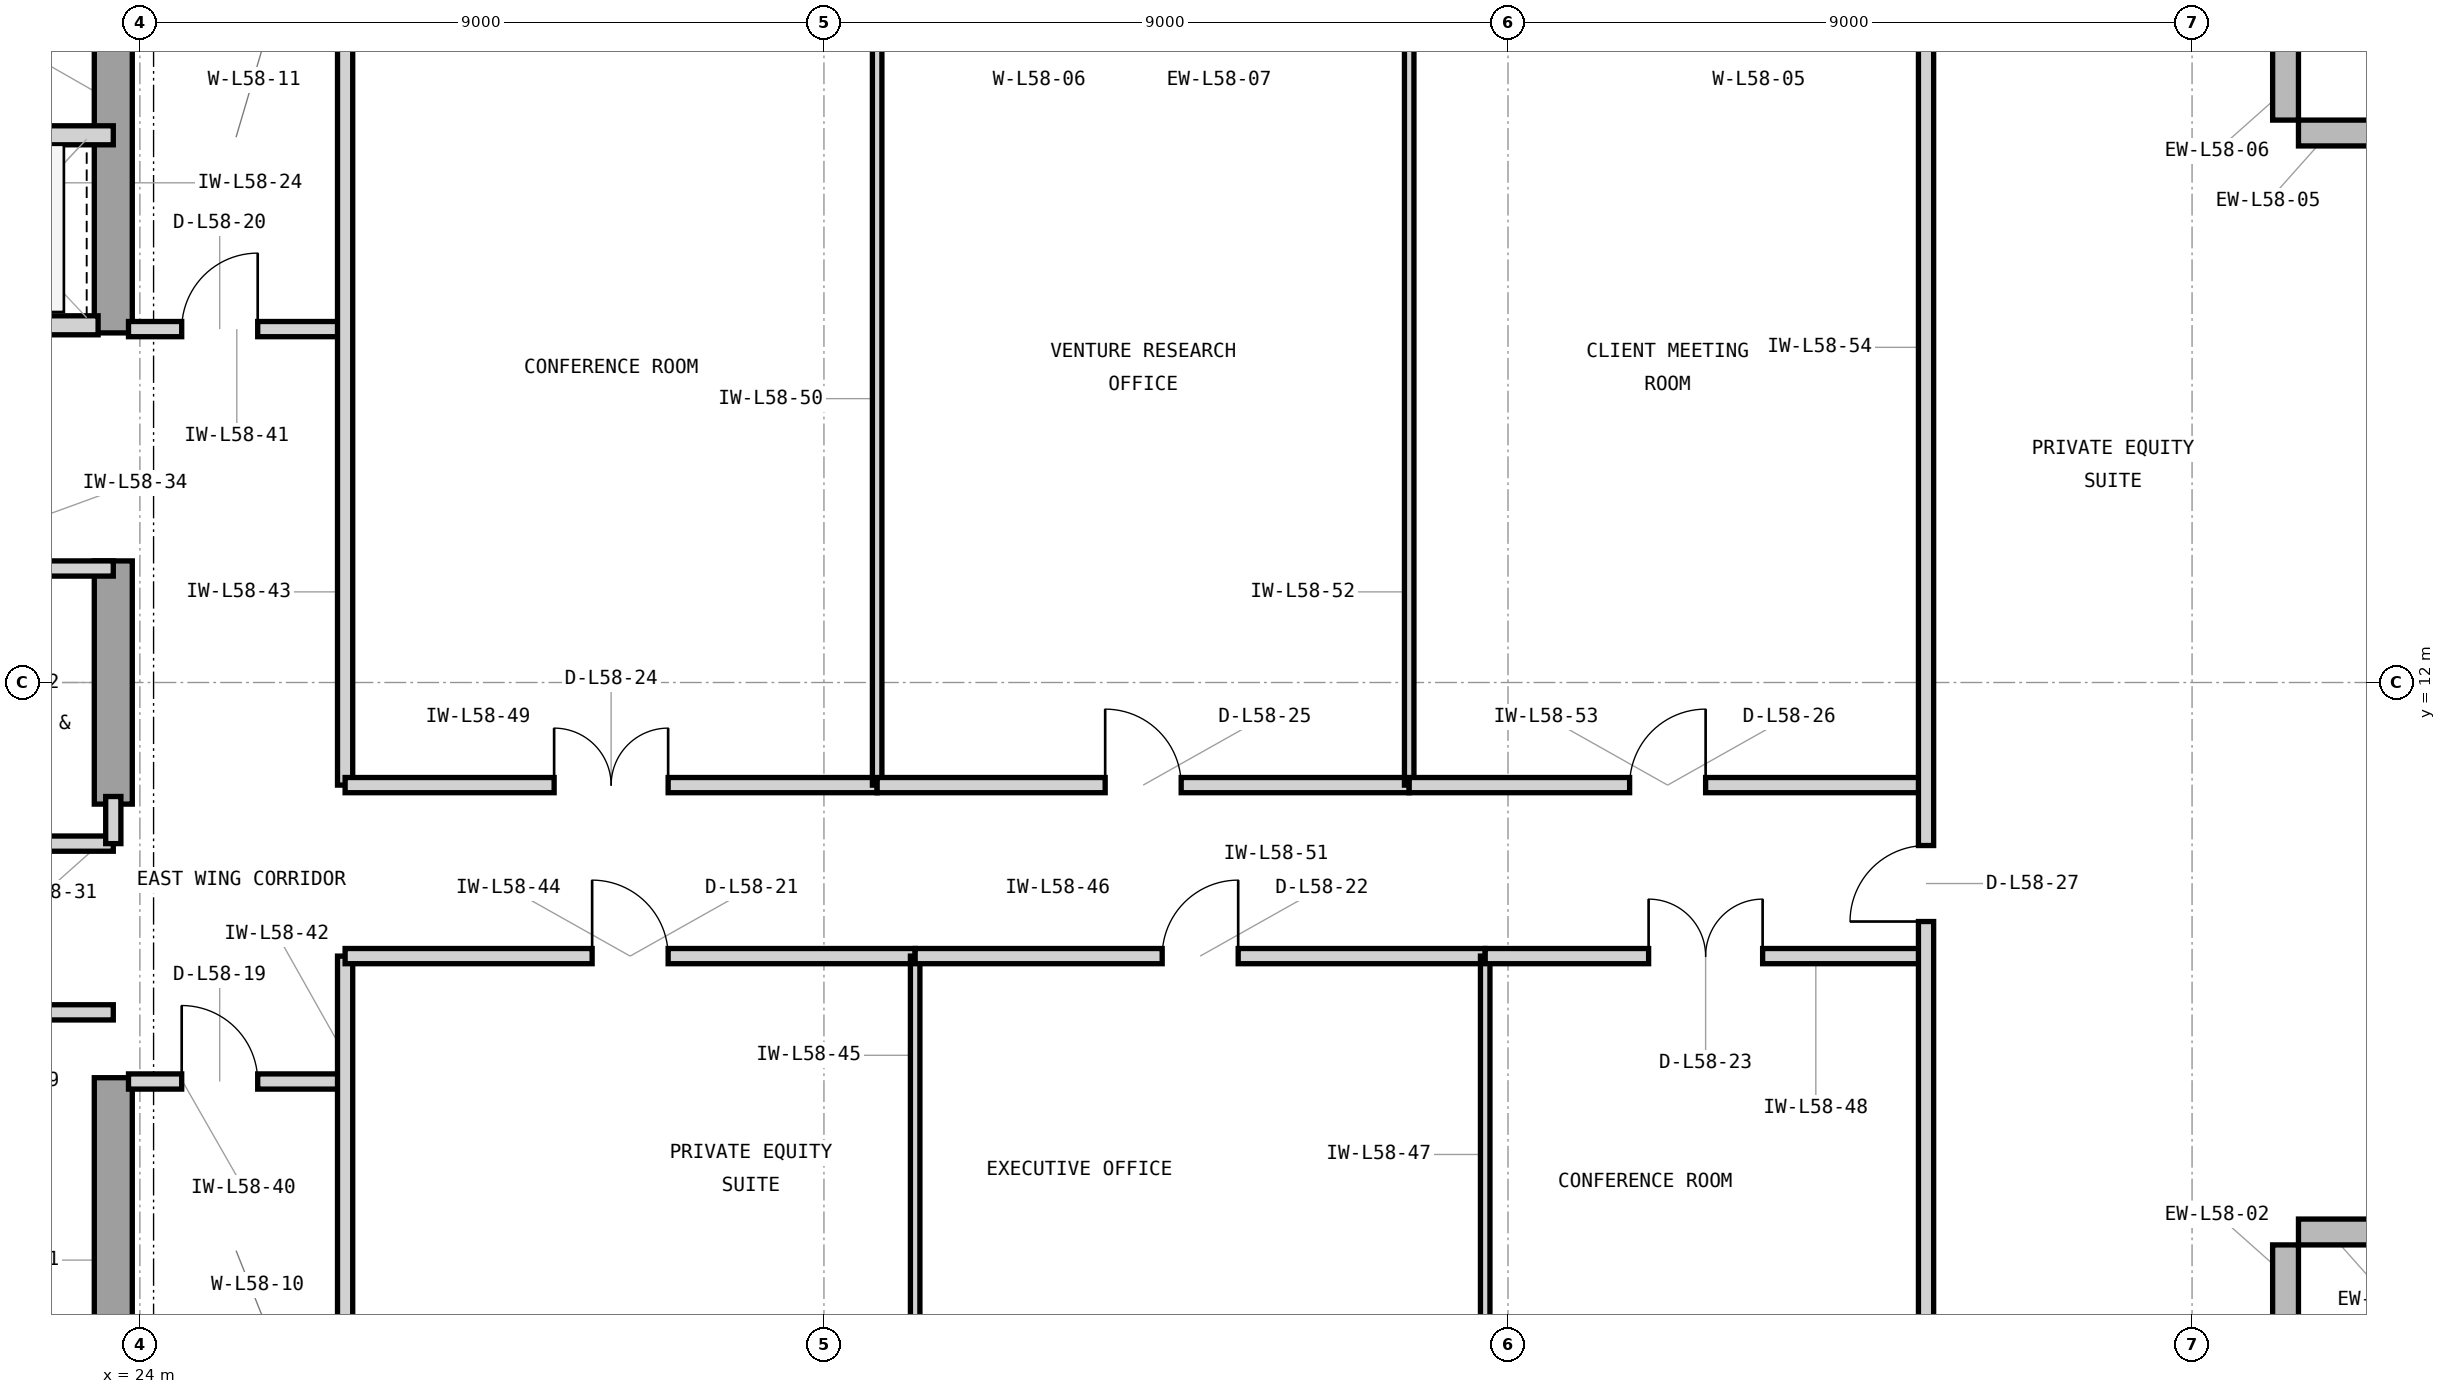
"""IFC4 building model, lengths in metres.
Left out: names, types, materials, properties, quantities, classifications, styles, units other than length and angle.
Written with IfcOpenShell. Run it as: python <this file> out.ifc"""

import sys

from ifc_helpers import new_model, si_unit, direction, frame, frame_2d, origin, place, context, subcontext, project, spatial, rectangle, extrude, element, fill, save


model = new_model("IFC4")
c1 = context("Model", 3, precision=1e-05, world=origin(), true_north=direction((0.0, 1.0)))
c2 = subcontext(c1, "Body", "Model", "MODEL_VIEW")
j1 = project(units=[si_unit("LENGTHUNIT", "METRE"), si_unit("PLANEANGLEUNIT", "RADIAN")], contexts=[c1])
p1 = place(None, origin())
s1 = spatial("IfcSite", under=j1, at=p1, CompositionType="ELEMENT")
p2 = place(p1, origin())
s2 = spatial("IfcBuilding", under=s1, at=p2, CompositionType="ELEMENT")
p3 = place(p2, frame((0.0, 0.0, 239.1)))
s3 = spatial("IfcBuildingStorey", under=s2, at=p3, CompositionType="ELEMENT", Elevation=239.1)
p4 = place(p3, frame((23.65, 3.6, 0.0), z_axis=(0.0, 0.0, 1.0), x_axis=(0.0, 1.0, 0.0)))
e1 = element("IfcWall", 1, at=p4, inside=s3, PredefinedType="SHEAR", context=c2, shape_type="SweptSolid", body=[
    extrude(rectangle(XDim=3.2, YDim=0.5, at=frame_2d((1.6, 0.0))), origin(), (0.0, 0.0, 1.0), 3.9),
])
p5 = place(p3, frame((23.65, 10.4, 0.0), z_axis=(0.0, 0.0, 1.0), x_axis=(0.0, 1.0, 0.0)))
e2 = element("IfcWall", 2, at=p5, inside=s3, PredefinedType="SHEAR", context=c2, shape_type="SweptSolid", body=[
    extrude(rectangle(XDim=3.2, YDim=0.5, at=frame_2d((1.6, 0.0))), origin(), (0.0, 0.0, 1.0), 3.9),
])
p6 = place(p3, frame((23.65, 16.6, 0.0), z_axis=(0.0, 0.0, 1.0), x_axis=(0.0, 1.0, 0.0)))
e3 = element("IfcWall", 3, at=p6, inside=s3, PredefinedType="SHEAR", context=c2, shape_type="SweptSolid", body=[
    extrude(rectangle(XDim=4.05, YDim=0.5, at=frame_2d((2.025, 0.0))), origin(), (0.0, 0.0, 1.0), 3.9),
])
for number, where, z_axis, x_axis in (
    (4, (52.23, 3.0, 0.0), (0.0, 0.0, 1.0), (0.0, 1.0, 0.0)),
    (5, (52.4, 4.77, 0.0), (0.0, 0.0, 1.0), (1.0, 0.0, 0.0)),
    (6, (54.0, 19.23, 0.0), (0.0, 0.0, 1.0), (-1.0, 0.0, 0.0)),
    (7, (52.23, 19.4, 0.0), (0.0, 0.0, 1.0), (0.0, 1.0, 0.0)),
):
    element("IfcWall", number, at=place(p3, frame(where, z_axis=z_axis, x_axis=x_axis)), inside=s3, PredefinedType="STANDARD", context=c2, shape_type="SweptSolid", body=[
        extrude(rectangle(XDim=1.6, YDim=0.34, at=frame_2d((0.8, 0.0))), origin(), (0.0, 0.0, 1.0), 3.7),
    ])
p7 = place(p3, frame((21.05, 16.7, 0.0), z_axis=(0.0, 0.0, 1.0), x_axis=(1.0, 0.0, 0.0)))
e8 = element("IfcWall", 8, at=p7, inside=s3, PredefinedType="PARTITIONING", context=c2, shape_type="SweptSolid", body=[
    extrude(rectangle(XDim=2.4, YDim=0.25, at=frame_2d((1.2, 0.0))), origin(), (0.0, 0.0, 1.0), 3.073),
])
p8 = place(p7, frame((0.52, 0.0, 0.0)))
e9 = element("IfcOpeningElement", 9, at=p8, cuts=e8, PredefinedType="OPENING", context=c2, shape_type="SweptSolid", body=[
    extrude(rectangle(XDim=1.15, YDim=2.25, at=frame_2d((0.575, 1.125))), frame((0.0, 0.135, 0.0), z_axis=(0.0, -1.0, 0.0), x_axis=(1.0, 0.0, 0.0)), (0.0, 0.0, 1.0), 0.27),
])
p9 = place(p3, frame((16.45, 19.2, 0.0), z_axis=(0.0, 0.0, 1.0), x_axis=(1.0, 0.0, 0.0)))
e10 = element("IfcWall", 10, at=p9, inside=s3, PredefinedType="PARTITIONING", context=c2, shape_type="SweptSolid", body=[
    extrude(rectangle(XDim=7.2, YDim=0.25, at=frame_2d((3.6, 0.0))), origin(), (0.0, 0.0, 1.0), 3.69),
])
p10 = place(p3, frame((20.85, 7.66, 0.0), z_axis=(0.0, 0.0, 1.0), x_axis=(1.0, 0.0, 0.0)))
e11 = element("IfcWall", 11, at=p10, inside=s3, PredefinedType="PARTITIONING", context=c2, shape_type="SweptSolid", body=[
    extrude(rectangle(XDim=2.8, YDim=0.2, at=frame_2d((1.4, 0.0))), origin(), (0.0, 0.0, 1.0), 3.69),
])
p11 = place(p10, frame((0.95, 0.0, 0.0)))
e12 = element("IfcOpeningElement", 12, at=p11, cuts=e11, PredefinedType="OPENING", context=c2, shape_type="SweptSolid", body=[
    extrude(rectangle(XDim=0.9, YDim=2.1, at=frame_2d((0.45, 1.05))), frame((0.0, 0.11, 0.0), z_axis=(0.0, -1.0, 0.0), x_axis=(1.0, 0.0, 0.0)), (0.0, 0.0, 1.0), 0.22),
])
p12 = place(p3, frame((14.825, 9.88, 0.0), z_axis=(0.0, 0.0, 1.0), x_axis=(1.0, 0.0, 0.0)))
e13 = element("IfcWall", 13, at=p12, inside=s3, PredefinedType="PARTITIONING", context=c2, shape_type="SweptSolid", body=[
    extrude(rectangle(XDim=8.825, YDim=0.2, at=frame_2d((4.413, 0.0))), origin(), (0.0, 0.0, 1.0), 3.69),
])
p13 = place(p3, frame((23.65, 9.88, 0.0), z_axis=(0.0, 0.0, 1.0), x_axis=(0.0, 1.0, 0.0)))
e14 = element("IfcWall", 14, at=p13, inside=s3, PredefinedType="PARTITIONING", context=c2, shape_type="SweptSolid", body=[
    extrude(rectangle(XDim=0.62, YDim=0.2, at=frame_2d((0.31, 0.0))), origin(), (0.0, 0.0, 1.0), 3.69),
])
p14 = place(p3, frame((19.9, 13.5, 0.0), z_axis=(0.0, 0.0, 1.0), x_axis=(1.0, 0.0, 0.0)))
e15 = element("IfcWall", 15, at=p14, inside=s3, PredefinedType="PARTITIONING", context=c2, shape_type="SweptSolid", body=[
    extrude(rectangle(XDim=3.75, YDim=0.2, at=frame_2d((1.875, 0.0))), origin(), (0.0, 0.0, 1.0), 3.073),
])
p15 = place(p14, frame((1.4, 0.0, 0.0)))
e16 = element("IfcOpeningElement", 16, at=p15, cuts=e15, PredefinedType="OPENING", context=c2, shape_type="SweptSolid", body=[
    extrude(rectangle(XDim=0.95, YDim=2.1, at=frame_2d((0.475, 1.05))), frame((0.0, 0.11, 0.0), z_axis=(0.0, -1.0, 0.0), x_axis=(1.0, 0.0, 0.0)), (0.0, 0.0, 1.0), 0.22),
])
p16 = place(p3, frame((23.85, 6.75, 0.0), z_axis=(0.0, 0.0, 1.0), x_axis=(1.0, 0.0, 0.0)))
e17 = element("IfcWall", 17, at=p16, inside=s3, PredefinedType="PARTITIONING", context=c2, shape_type="SweptSolid", body=[
    extrude(rectangle(XDim=2.85, YDim=0.2, at=frame_2d((1.425, 0.0))), origin(), (0.0, 0.0, 1.0), 3.69),
])
p17 = place(p16, frame((0.7, 0.0, 0.0)))
e18 = element("IfcOpeningElement", 18, at=p17, cuts=e17, PredefinedType="OPENING", context=c2, shape_type="SweptSolid", body=[
    extrude(rectangle(XDim=1.0, YDim=2.15, at=frame_2d((0.5, 1.075))), frame((0.0, 0.11, 0.0), z_axis=(0.0, -1.0, 0.0), x_axis=(1.0, 0.0, 0.0)), (0.0, 0.0, 1.0), 0.22),
])
p18 = place(p3, frame((23.85, 16.65, 0.0), z_axis=(0.0, 0.0, 1.0), x_axis=(1.0, 0.0, 0.0)))
e19 = element("IfcWall", 19, at=p18, inside=s3, PredefinedType="PARTITIONING", context=c2, shape_type="SweptSolid", body=[
    extrude(rectangle(XDim=2.85, YDim=0.2, at=frame_2d((1.425, 0.0))), origin(), (0.0, 0.0, 1.0), 3.69),
])
p19 = place(p18, frame((0.7, 0.0, 0.0)))
e20 = element("IfcOpeningElement", 20, at=p19, cuts=e19, PredefinedType="OPENING", context=c2, shape_type="SweptSolid", body=[
    extrude(rectangle(XDim=1.0, YDim=2.15, at=frame_2d((0.5, 1.075))), frame((0.0, 0.11, 0.0), z_axis=(0.0, -1.0, 0.0), x_axis=(1.0, 0.0, 0.0)), (0.0, 0.0, 1.0), 0.22),
])
p20 = place(p3, frame((26.7, 3.18, 0.0), z_axis=(0.0, 0.0, 1.0), x_axis=(0.0, 1.0, 0.0)))
e21 = element("IfcWall", 21, at=p20, inside=s3, PredefinedType="PARTITIONING", context=c2, shape_type="SweptSolid", body=[
    extrude(rectangle(XDim=5.22, YDim=0.2, at=frame_2d((2.61, 0.0))), origin(), (0.0, 0.0, 1.0), 3.69),
])
p21 = place(p3, frame((26.7, 10.65, 0.0), z_axis=(0.0, 0.0, 1.0), x_axis=(0.0, 1.0, 0.0)))
e22 = element("IfcWall", 22, at=p21, inside=s3, PredefinedType="PARTITIONING", context=c2, shape_type="SweptSolid", body=[
    extrude(rectangle(XDim=10.17, YDim=0.2, at=frame_2d((5.085, 0.0))), origin(), (0.0, 0.0, 1.0), 3.69),
])
p22 = place(p3, frame((26.7, 8.4, 0.0), z_axis=(0.0, 0.0, 1.0), x_axis=(1.0, 0.0, 0.0)))
e23 = element("IfcWall", 23, at=p22, inside=s3, PredefinedType="PARTITIONING", context=c2, shape_type="SweptSolid", body=[
    extrude(rectangle(XDim=7.5, YDim=0.2, at=frame_2d((3.75, 0.0))), origin(), (0.0, 0.0, 1.0), 3.69),
])
p23 = place(p22, frame((3.25, 0.0, 0.0)))
e24 = element("IfcOpeningElement", 24, at=p23, cuts=e23, PredefinedType="OPENING", context=c2, shape_type="SweptSolid", body=[
    extrude(rectangle(XDim=1.0, YDim=2.15, at=frame_2d((0.5, 1.075))), frame((0.0, 0.11, 0.0), z_axis=(0.0, -1.0, 0.0), x_axis=(1.0, 0.0, 0.0)), (0.0, 0.0, 1.0), 0.22),
])
p24 = place(p3, frame((34.2, 3.18, 0.0), z_axis=(0.0, 0.0, 1.0), x_axis=(0.0, 1.0, 0.0)))
e25 = element("IfcWall", 25, at=p24, inside=s3, PredefinedType="PARTITIONING", context=c2, shape_type="SweptSolid", body=[
    extrude(rectangle(XDim=5.22, YDim=0.125, at=frame_2d((2.61, 0.0))), origin(), (0.0, 0.0, 1.0), 3.69),
])
p25 = place(p3, frame((34.2, 8.4, 0.0), z_axis=(0.0, 0.0, 1.0), x_axis=(1.0, 0.0, 0.0)))
e26 = element("IfcWall", 26, at=p25, inside=s3, PredefinedType="PARTITIONING", context=c2, shape_type="SweptSolid", body=[
    extrude(rectangle(XDim=7.5, YDim=0.2, at=frame_2d((3.75, 0.0))), origin(), (0.0, 0.0, 1.0), 3.69),
])
p26 = place(p25, frame((3.25, 0.0, 0.0)))
e27 = element("IfcOpeningElement", 27, at=p26, cuts=e26, PredefinedType="OPENING", context=c2, shape_type="SweptSolid", body=[
    extrude(rectangle(XDim=1.0, YDim=2.15, at=frame_2d((0.5, 1.075))), frame((0.0, 0.11, 0.0), z_axis=(0.0, -1.0, 0.0), x_axis=(1.0, 0.0, 0.0)), (0.0, 0.0, 1.0), 0.22),
])
p27 = place(p3, frame((41.7, 3.18, 0.0), z_axis=(0.0, 0.0, 1.0), x_axis=(0.0, 1.0, 0.0)))
e28 = element("IfcWall", 28, at=p27, inside=s3, PredefinedType="PARTITIONING", context=c2, shape_type="SweptSolid", body=[
    extrude(rectangle(XDim=5.22, YDim=0.125, at=frame_2d((2.61, 0.0))), origin(), (0.0, 0.0, 1.0), 3.69),
])
p28 = place(p3, frame((41.7, 8.4, 0.0), z_axis=(0.0, 0.0, 1.0), x_axis=(1.0, 0.0, 0.0)))
e29 = element("IfcWall", 29, at=p28, inside=s3, PredefinedType="PARTITIONING", context=c2, shape_type="SweptSolid", body=[
    extrude(rectangle(XDim=5.8, YDim=0.2, at=frame_2d((2.9, 0.0))), origin(), (0.0, 0.0, 1.0), 3.69),
])
p29 = place(p28, frame((2.15, 0.0, 0.0)))
e30 = element("IfcOpeningElement", 30, at=p29, cuts=e29, PredefinedType="OPENING", context=c2, shape_type="SweptSolid", body=[
    extrude(rectangle(XDim=1.5, YDim=2.3, at=frame_2d((0.75, 1.15))), frame((0.0, 0.11, 0.0), z_axis=(0.0, -1.0, 0.0), x_axis=(1.0, 0.0, 0.0)), (0.0, 0.0, 1.0), 0.22),
])
p30 = place(p3, frame((26.7, 10.65, 0.0), z_axis=(0.0, 0.0, 1.0), x_axis=(1.0, 0.0, 0.0)))
e31 = element("IfcWall", 31, at=p30, inside=s3, PredefinedType="PARTITIONING", context=c2, shape_type="SweptSolid", body=[
    extrude(rectangle(XDim=7.0, YDim=0.2, at=frame_2d((3.5, 0.0))), origin(), (0.0, 0.0, 1.0), 3.69),
])
p31 = place(p30, frame((2.75, 0.0, 0.0)))
e32 = element("IfcOpeningElement", 32, at=p31, cuts=e31, PredefinedType="OPENING", context=c2, shape_type="SweptSolid", body=[
    extrude(rectangle(XDim=1.5, YDim=2.3, at=frame_2d((0.75, 1.15))), frame((0.0, 0.11, 0.0), z_axis=(0.0, -1.0, 0.0), x_axis=(1.0, 0.0, 0.0)), (0.0, 0.0, 1.0), 0.22),
])
p32 = place(p3, frame((33.7, 10.65, 0.0), z_axis=(0.0, 0.0, 1.0), x_axis=(0.0, 1.0, 0.0)))
e33 = element("IfcWall", 33, at=p32, inside=s3, PredefinedType="PARTITIONING", context=c2, shape_type="SweptSolid", body=[
    extrude(rectangle(XDim=10.17, YDim=0.125, at=frame_2d((5.085, 0.0))), origin(), (0.0, 0.0, 1.0), 3.69),
])
p33 = place(p3, frame((33.7, 10.65, 0.0), z_axis=(0.0, 0.0, 1.0), x_axis=(1.0, 0.0, 0.0)))
e34 = element("IfcWall", 34, at=p33, inside=s3, PredefinedType="PARTITIONING", context=c2, shape_type="SweptSolid", body=[
    extrude(rectangle(XDim=7.0, YDim=0.2, at=frame_2d((3.5, 0.0))), origin(), (0.0, 0.0, 1.0), 3.69),
])
p34 = place(p33, frame((3.0, 0.0, 0.0)))
e35 = element("IfcOpeningElement", 35, at=p34, cuts=e34, PredefinedType="OPENING", context=c2, shape_type="SweptSolid", body=[
    extrude(rectangle(XDim=1.0, YDim=2.15, at=frame_2d((0.5, 1.075))), frame((0.0, 0.11, 0.0), z_axis=(0.0, -1.0, 0.0), x_axis=(1.0, 0.0, 0.0)), (0.0, 0.0, 1.0), 0.22),
])
p35 = place(p3, frame((40.7, 10.65, 0.0), z_axis=(0.0, 0.0, 1.0), x_axis=(0.0, 1.0, 0.0)))
e36 = element("IfcWall", 36, at=p35, inside=s3, PredefinedType="PARTITIONING", context=c2, shape_type="SweptSolid", body=[
    extrude(rectangle(XDim=10.17, YDim=0.125, at=frame_2d((5.085, 0.0))), origin(), (0.0, 0.0, 1.0), 3.69),
])
p36 = place(p3, frame((40.7, 10.65, 0.0), z_axis=(0.0, 0.0, 1.0), x_axis=(1.0, 0.0, 0.0)))
e37 = element("IfcWall", 37, at=p36, inside=s3, PredefinedType="PARTITIONING", context=c2, shape_type="SweptSolid", body=[
    extrude(rectangle(XDim=6.8, YDim=0.2, at=frame_2d((3.4, 0.0))), origin(), (0.0, 0.0, 1.0), 3.69),
])
p37 = place(p36, frame((2.9, 0.0, 0.0)))
e38 = element("IfcOpeningElement", 38, at=p37, cuts=e37, PredefinedType="OPENING", context=c2, shape_type="SweptSolid", body=[
    extrude(rectangle(XDim=1.0, YDim=2.15, at=frame_2d((0.5, 1.075))), frame((0.0, 0.11, 0.0), z_axis=(0.0, -1.0, 0.0), x_axis=(1.0, 0.0, 0.0)), (0.0, 0.0, 1.0), 0.22),
])
p38 = place(p3, frame((47.5, 3.18, 0.0), z_axis=(0.0, 0.0, 1.0), x_axis=(0.0, 1.0, 0.0)))
e39 = element("IfcWall", 39, at=p38, inside=s3, PredefinedType="PARTITIONING", context=c2, shape_type="SweptSolid", body=[
    extrude(rectangle(XDim=17.64, YDim=0.2, at=frame_2d((8.82, 0.0))), origin(), (0.0, 0.0, 1.0), 3.69),
])
p39 = place(p38, frame((5.675, 0.0, 0.0)))
e40 = element("IfcOpeningElement", 40, at=p39, cuts=e39, PredefinedType="OPENING", context=c2, shape_type="SweptSolid", body=[
    extrude(rectangle(XDim=1.0, YDim=2.15, at=frame_2d((0.5, 1.075))), frame((0.0, 0.11, 0.0), z_axis=(0.0, -1.0, 0.0), x_axis=(1.0, 0.0, 0.0)), (0.0, 0.0, 1.0), 0.22),
])
p40 = place(p17, origin())
e41 = element("IfcDoor", 41, at=p40, inside=s3, OperationType="SINGLE_SWING_LEFT", PredefinedType="DOOR", context=c2, shape_type="SweptSolid", body=[
    extrude(rectangle(XDim=1.0, YDim=2.15, at=frame_2d((0.5, 1.075))), frame((0.0, 0.025, 0.0), z_axis=(0.0, -1.0, 0.0), x_axis=(1.0, 0.0, 0.0)), (0.0, 0.0, 1.0), 0.05),
])
fill(e18, e41)
p41 = place(p19, origin())
e42 = element("IfcDoor", 42, at=p41, inside=s3, OperationType="SINGLE_SWING_RIGHT", PredefinedType="DOOR", context=c2, shape_type="SweptSolid", body=[
    extrude(rectangle(XDim=1.0, YDim=2.15, at=frame_2d((0.5, 1.075))), frame((0.0, 0.025, 0.0), z_axis=(0.0, -1.0, 0.0), x_axis=(1.0, 0.0, 0.0)), (0.0, 0.0, 1.0), 0.05),
])
fill(e20, e42)
p42 = place(p23, origin())
e43 = element("IfcDoor", 43, at=p42, inside=s3, OperationType="SINGLE_SWING_LEFT", PredefinedType="DOOR", context=c2, shape_type="SweptSolid", body=[
    extrude(rectangle(XDim=1.0, YDim=2.15, at=frame_2d((0.5, 1.075))), frame((0.0, 0.025, 0.0), z_axis=(0.0, -1.0, 0.0), x_axis=(1.0, 0.0, 0.0)), (0.0, 0.0, 1.0), 0.05),
])
fill(e24, e43)
p43 = place(p26, origin())
e44 = element("IfcDoor", 44, at=p43, inside=s3, OperationType="SINGLE_SWING_RIGHT", PredefinedType="DOOR", context=c2, shape_type="SweptSolid", body=[
    extrude(rectangle(XDim=1.0, YDim=2.15, at=frame_2d((0.5, 1.075))), frame((0.0, 0.025, 0.0), z_axis=(0.0, -1.0, 0.0), x_axis=(1.0, 0.0, 0.0)), (0.0, 0.0, 1.0), 0.05),
])
fill(e27, e44)
p44 = place(p29, origin())
e45 = element("IfcDoor", 45, at=p44, inside=s3, OperationType="DOUBLE_DOOR_SINGLE_SWING", PredefinedType="DOOR", context=c2, shape_type="SweptSolid", body=[
    extrude(rectangle(XDim=1.5, YDim=2.3, at=frame_2d((0.75, 1.15))), frame((0.0, 0.025, 0.0), z_axis=(0.0, -1.0, 0.0), x_axis=(1.0, 0.0, 0.0)), (0.0, 0.0, 1.0), 0.05),
])
fill(e30, e45)
p45 = place(p31, origin())
e46 = element("IfcDoor", 46, at=p45, inside=s3, OperationType="DOUBLE_DOOR_SINGLE_SWING", PredefinedType="DOOR", context=c2, shape_type="SweptSolid", body=[
    extrude(rectangle(XDim=1.5, YDim=2.3, at=frame_2d((0.75, 1.15))), frame((0.0, 0.025, 0.0), z_axis=(0.0, -1.0, 0.0), x_axis=(1.0, 0.0, 0.0)), (0.0, 0.0, 1.0), 0.05),
])
fill(e32, e46)
p46 = place(p34, origin())
e47 = element("IfcDoor", 47, at=p46, inside=s3, OperationType="SINGLE_SWING_LEFT", PredefinedType="DOOR", context=c2, shape_type="SweptSolid", body=[
    extrude(rectangle(XDim=1.0, YDim=2.15, at=frame_2d((0.5, 1.075))), frame((0.0, 0.025, 0.0), z_axis=(0.0, -1.0, 0.0), x_axis=(1.0, 0.0, 0.0)), (0.0, 0.0, 1.0), 0.05),
])
fill(e35, e47)
p47 = place(p37, origin())
e48 = element("IfcDoor", 48, at=p47, inside=s3, OperationType="SINGLE_SWING_RIGHT", PredefinedType="DOOR", context=c2, shape_type="SweptSolid", body=[
    extrude(rectangle(XDim=1.0, YDim=2.15, at=frame_2d((0.5, 1.075))), frame((0.0, 0.025, 0.0), z_axis=(0.0, -1.0, 0.0), x_axis=(1.0, 0.0, 0.0)), (0.0, 0.0, 1.0), 0.05),
])
fill(e38, e48)
p48 = place(p39, origin())
e49 = element("IfcDoor", 49, at=p48, inside=s3, OperationType="SINGLE_SWING_LEFT", PredefinedType="DOOR", context=c2, shape_type="SweptSolid", body=[
    extrude(rectangle(XDim=1.0, YDim=2.15, at=frame_2d((0.5, 1.075))), frame((0.0, 0.025, 0.0), z_axis=(0.0, -1.0, 0.0), x_axis=(1.0, 0.0, 0.0)), (0.0, 0.0, 1.0), 0.05),
])
fill(e40, e49)
save(model, sys.argv[1])
